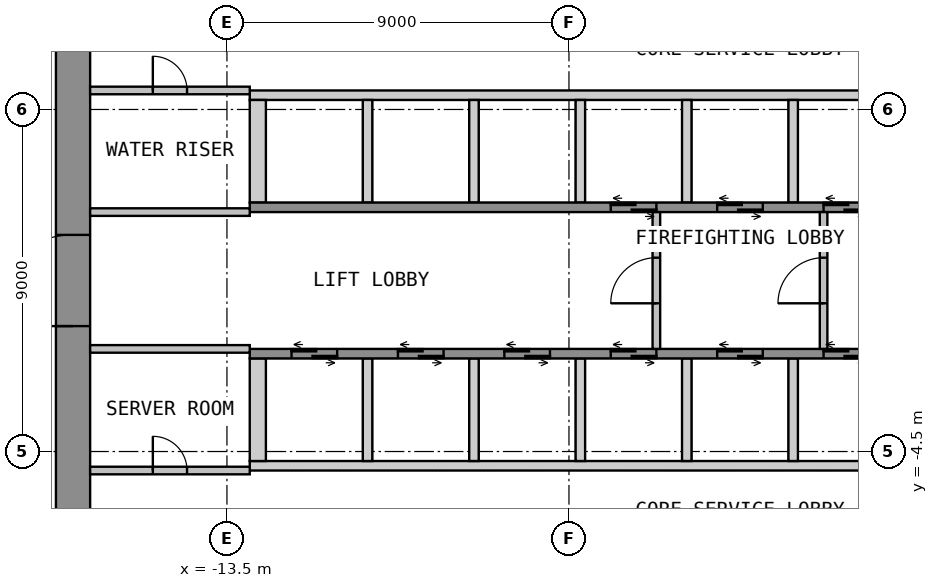
"""IFC4 building model, lengths in metres.
Left out: names, types, materials, properties, quantities, classifications, styles, units other than length and angle.
Written with IfcOpenShell. Run it as: python <this file> out.ifc"""

import sys

from ifc_helpers import new_model, si_unit, direction, frame, frame_2d, origin, place, context, subcontext, project, spatial, polyline, rectangle, outline, extrude, element, fill, save


model = new_model("IFC4")
c1 = context("Model", 3, precision=1e-05, world=origin(), true_north=direction((0.0, 1.0)))
c2 = subcontext(c1, "Body", "Model", "MODEL_VIEW")
j1 = project(units=[si_unit("LENGTHUNIT", "METRE"), si_unit("PLANEANGLEUNIT", "RADIAN")], contexts=[c1])
p1 = place(None, origin())
s1 = spatial("IfcSite", under=j1, at=p1, CompositionType="ELEMENT")
p2 = place(p1, origin())
s2 = spatial("IfcBuilding", under=s1, at=p2, CompositionType="ELEMENT")
p3 = place(p2, frame((0.0, 0.0, 30.0)))
s3 = spatial("IfcBuildingStorey", under=s2, at=p3, CompositionType="ELEMENT", Elevation=30.0)
p4 = place(p3, frame((-17.55, -12.6, 0.0), z_axis=(0.0, 0.0, 1.0), x_axis=(0.0, 1.0, 0.0)))
e1 = element("IfcWall", 1, at=p4, inside=s3, PredefinedType="SHEAR", context=c2, shape_type="SweptSolid", body=[
    extrude(rectangle(XDim=25.2, YDim=0.9, at=frame_2d((12.6, 0.0))), origin(), (0.0, 0.0, 1.0), 3.525),
])
p5 = place(p4, frame((11.4, 0.0, 0.0)))
e2 = element("IfcOpeningElement", 2, at=p5, cuts=e1, PredefinedType="OPENING", context=c2, shape_type="SweptSolid", body=[
    extrude(rectangle(XDim=2.4, YDim=2.1, at=frame_2d((1.2, 1.05))), frame((0.0, 0.46, 0.0), z_axis=(0.0, -1.0, 0.0), x_axis=(1.0, 0.0, 0.0)), (0.0, 0.0, 1.0), 0.92),
])
p6 = place(p3, origin())
e3 = element("IfcWall", 3, at=p6, inside=s3, PredefinedType="SHEAR", context=c2, shape_type="SweptSolid", body=[
    extrude(outline(polyline([(-12.9, 4.75), (12.9, 4.75), (12.9, 5.0), (-12.9, 5.0), (-12.9, 4.75)])), origin(), (0.0, 0.0, 1.0), 3.525),
])
p7 = place(p3, origin())
e4 = element("IfcWall", 4, at=p7, inside=s3, PredefinedType="SHEAR", context=c2, shape_type="SweptSolid", body=[
    extrude(outline(polyline([(-12.9, 2.05), (-12.475, 2.05), (-12.475, 4.75), (-12.9, 4.75), (-12.9, 2.05)])), origin(), (0.0, 0.0, 1.0), 3.525),
])
p8 = place(p3, origin())
e5 = element("IfcWall", 5, at=p8, inside=s3, PredefinedType="SHEAR", context=c2, shape_type="SweptSolid", body=[
    extrude(outline(polyline([(-9.925, 2.05), (-9.675, 2.05), (-9.675, 4.75), (-9.925, 4.75), (-9.925, 2.05)])), origin(), (0.0, 0.0, 1.0), 3.525),
])
p9 = place(p3, origin())
e6 = element("IfcWall", 6, at=p9, inside=s3, PredefinedType="SHEAR", context=c2, shape_type="SweptSolid", body=[
    extrude(outline(polyline([(-7.125, 2.05), (-6.875, 2.05), (-6.875, 4.75), (-7.125, 4.75), (-7.125, 2.05)])), origin(), (0.0, 0.0, 1.0), 3.525),
])
p10 = place(p3, origin())
e7 = element("IfcWall", 7, at=p10, inside=s3, PredefinedType="SHEAR", context=c2, shape_type="SweptSolid", body=[
    extrude(outline(polyline([(-4.325, 2.05), (-4.075, 2.05), (-4.075, 4.75), (-4.325, 4.75), (-4.325, 2.05)])), origin(), (0.0, 0.0, 1.0), 3.525),
])
p11 = place(p3, origin())
e8 = element("IfcWall", 8, at=p11, inside=s3, PredefinedType="SHEAR", context=c2, shape_type="SweptSolid", body=[
    extrude(outline(polyline([(-1.525, 2.05), (-1.275, 2.05), (-1.275, 4.75), (-1.525, 4.75), (-1.525, 2.05)])), origin(), (0.0, 0.0, 1.0), 3.525),
])
p12 = place(p3, origin())
e9 = element("IfcWall", 9, at=p12, inside=s3, PredefinedType="SHEAR", context=c2, shape_type="SweptSolid", body=[
    extrude(outline(polyline([(1.275, 2.05), (1.525, 2.05), (1.525, 4.75), (1.275, 4.75), (1.275, 2.05)])), origin(), (0.0, 0.0, 1.0), 3.525),
])
p13 = place(p3, frame((-12.9, 1.925, 0.0), z_axis=(0.0, 0.0, 1.0), x_axis=(1.0, 0.0, 0.0)))
e10 = element("IfcWall", 10, at=p13, inside=s3, PredefinedType="SHEAR", context=c2, shape_type="SweptSolid", body=[
    extrude(rectangle(XDim=25.8, YDim=0.25, at=frame_2d((12.9, 0.0))), origin(), (0.0, 0.0, 1.0), 3.525),
])
p14 = place(p13, frame((9.5, 0.0, 0.0)))
e11 = element("IfcOpeningElement", 11, at=p14, cuts=e10, PredefinedType="OPENING", context=c2, shape_type="SweptSolid", body=[
    extrude(rectangle(XDim=1.2, YDim=2.1, at=frame_2d((0.6, 1.05))), frame((0.0, 0.135, 0.0), z_axis=(0.0, -1.0, 0.0), x_axis=(1.0, 0.0, 0.0)), (0.0, 0.0, 1.0), 0.27),
])
p15 = place(p13, frame((12.3, 0.0, 0.0)))
e12 = element("IfcOpeningElement", 12, at=p15, cuts=e10, PredefinedType="OPENING", context=c2, shape_type="SweptSolid", body=[
    extrude(rectangle(XDim=1.2, YDim=2.1, at=frame_2d((0.6, 1.05))), frame((0.0, 0.135, 0.0), z_axis=(0.0, -1.0, 0.0), x_axis=(1.0, 0.0, 0.0)), (0.0, 0.0, 1.0), 0.27),
])
p16 = place(p13, frame((15.1, 0.0, 0.0)))
e13 = element("IfcOpeningElement", 13, at=p16, cuts=e10, PredefinedType="OPENING", context=c2, shape_type="SweptSolid", body=[
    extrude(rectangle(XDim=1.2, YDim=2.1, at=frame_2d((0.6, 1.05))), frame((0.0, 0.135, 0.0), z_axis=(0.0, -1.0, 0.0), x_axis=(1.0, 0.0, 0.0)), (0.0, 0.0, 1.0), 0.27),
])
p17 = place(p13, frame((17.9, 0.0, 0.0)))
e14 = element("IfcOpeningElement", 14, at=p17, cuts=e10, PredefinedType="OPENING", context=c2, shape_type="SweptSolid", body=[
    extrude(rectangle(XDim=1.2, YDim=2.1, at=frame_2d((0.6, 1.05))), frame((0.0, 0.135, 0.0), z_axis=(0.0, -1.0, 0.0), x_axis=(1.0, 0.0, 0.0)), (0.0, 0.0, 1.0), 0.27),
])
p18 = place(p13, frame((20.7, 0.0, 0.0)))
e15 = element("IfcOpeningElement", 15, at=p18, cuts=e10, PredefinedType="OPENING", context=c2, shape_type="SweptSolid", body=[
    extrude(rectangle(XDim=1.2, YDim=2.1, at=frame_2d((0.6, 1.05))), frame((0.0, 0.135, 0.0), z_axis=(0.0, -1.0, 0.0), x_axis=(1.0, 0.0, 0.0)), (0.0, 0.0, 1.0), 0.27),
])
p19 = place(p13, frame((23.5, 0.0, 0.0)))
e16 = element("IfcOpeningElement", 16, at=p19, cuts=e10, PredefinedType="OPENING", context=c2, shape_type="SweptSolid", body=[
    extrude(rectangle(XDim=1.2, YDim=2.1, at=frame_2d((0.6, 1.05))), frame((0.0, 0.135, 0.0), z_axis=(0.0, -1.0, 0.0), x_axis=(1.0, 0.0, 0.0)), (0.0, 0.0, 1.0), 0.27),
])
p20 = place(p3, origin())
e17 = element("IfcWall", 17, at=p20, inside=s3, PredefinedType="SHEAR", context=c2, shape_type="SweptSolid", body=[
    extrude(outline(polyline([(-12.9, -5.0), (12.9, -5.0), (12.9, -4.75), (-12.9, -4.75), (-12.9, -5.0)])), origin(), (0.0, 0.0, 1.0), 3.525),
])
p21 = place(p3, origin())
e18 = element("IfcWall", 18, at=p21, inside=s3, PredefinedType="SHEAR", context=c2, shape_type="SweptSolid", body=[
    extrude(outline(polyline([(-12.9, -4.75), (-12.475, -4.75), (-12.475, -2.05), (-12.9, -2.05), (-12.9, -4.75)])), origin(), (0.0, 0.0, 1.0), 3.525),
])
p22 = place(p3, origin())
e19 = element("IfcWall", 19, at=p22, inside=s3, PredefinedType="SHEAR", context=c2, shape_type="SweptSolid", body=[
    extrude(outline(polyline([(-9.925, -4.75), (-9.675, -4.75), (-9.675, -2.05), (-9.925, -2.05), (-9.925, -4.75)])), origin(), (0.0, 0.0, 1.0), 3.525),
])
p23 = place(p3, origin())
e20 = element("IfcWall", 20, at=p23, inside=s3, PredefinedType="SHEAR", context=c2, shape_type="SweptSolid", body=[
    extrude(outline(polyline([(-7.125, -4.75), (-6.875, -4.75), (-6.875, -2.05), (-7.125, -2.05), (-7.125, -4.75)])), origin(), (0.0, 0.0, 1.0), 3.525),
])
p24 = place(p3, origin())
e21 = element("IfcWall", 21, at=p24, inside=s3, PredefinedType="SHEAR", context=c2, shape_type="SweptSolid", body=[
    extrude(outline(polyline([(-4.325, -4.75), (-4.075, -4.75), (-4.075, -2.05), (-4.325, -2.05), (-4.325, -4.75)])), origin(), (0.0, 0.0, 1.0), 3.525),
])
p25 = place(p3, origin())
e22 = element("IfcWall", 22, at=p25, inside=s3, PredefinedType="SHEAR", context=c2, shape_type="SweptSolid", body=[
    extrude(outline(polyline([(-1.525, -4.75), (-1.275, -4.75), (-1.275, -2.05), (-1.525, -2.05), (-1.525, -4.75)])), origin(), (0.0, 0.0, 1.0), 3.525),
])
p26 = place(p3, origin())
e23 = element("IfcWall", 23, at=p26, inside=s3, PredefinedType="SHEAR", context=c2, shape_type="SweptSolid", body=[
    extrude(outline(polyline([(1.275, -4.75), (1.525, -4.75), (1.525, -2.05), (1.275, -2.05), (1.275, -4.75)])), origin(), (0.0, 0.0, 1.0), 3.525),
])
p27 = place(p3, frame((-12.9, -1.925, 0.0), z_axis=(0.0, 0.0, 1.0), x_axis=(1.0, 0.0, 0.0)))
e24 = element("IfcWall", 24, at=p27, inside=s3, PredefinedType="SHEAR", context=c2, shape_type="SweptSolid", body=[
    extrude(rectangle(XDim=25.8, YDim=0.25, at=frame_2d((12.9, 0.0))), origin(), (0.0, 0.0, 1.0), 3.525),
])
p28 = place(p27, frame((1.1, 0.0, 0.0)))
e25 = element("IfcOpeningElement", 25, at=p28, cuts=e24, PredefinedType="OPENING", context=c2, shape_type="SweptSolid", body=[
    extrude(rectangle(XDim=1.2, YDim=2.1, at=frame_2d((0.6, 1.05))), frame((0.0, 0.135, 0.0), z_axis=(0.0, -1.0, 0.0), x_axis=(1.0, 0.0, 0.0)), (0.0, 0.0, 1.0), 0.27),
])
p29 = place(p27, frame((3.9, 0.0, 0.0)))
e26 = element("IfcOpeningElement", 26, at=p29, cuts=e24, PredefinedType="OPENING", context=c2, shape_type="SweptSolid", body=[
    extrude(rectangle(XDim=1.2, YDim=2.1, at=frame_2d((0.6, 1.05))), frame((0.0, 0.135, 0.0), z_axis=(0.0, -1.0, 0.0), x_axis=(1.0, 0.0, 0.0)), (0.0, 0.0, 1.0), 0.27),
])
p30 = place(p27, frame((6.7, 0.0, 0.0)))
e27 = element("IfcOpeningElement", 27, at=p30, cuts=e24, PredefinedType="OPENING", context=c2, shape_type="SweptSolid", body=[
    extrude(rectangle(XDim=1.2, YDim=2.1, at=frame_2d((0.6, 1.05))), frame((0.0, 0.135, 0.0), z_axis=(0.0, -1.0, 0.0), x_axis=(1.0, 0.0, 0.0)), (0.0, 0.0, 1.0), 0.27),
])
p31 = place(p27, frame((9.5, 0.0, 0.0)))
e28 = element("IfcOpeningElement", 28, at=p31, cuts=e24, PredefinedType="OPENING", context=c2, shape_type="SweptSolid", body=[
    extrude(rectangle(XDim=1.2, YDim=2.1, at=frame_2d((0.6, 1.05))), frame((0.0, 0.135, 0.0), z_axis=(0.0, -1.0, 0.0), x_axis=(1.0, 0.0, 0.0)), (0.0, 0.0, 1.0), 0.27),
])
p32 = place(p27, frame((12.3, 0.0, 0.0)))
e29 = element("IfcOpeningElement", 29, at=p32, cuts=e24, PredefinedType="OPENING", context=c2, shape_type="SweptSolid", body=[
    extrude(rectangle(XDim=1.2, YDim=2.1, at=frame_2d((0.6, 1.05))), frame((0.0, 0.135, 0.0), z_axis=(0.0, -1.0, 0.0), x_axis=(1.0, 0.0, 0.0)), (0.0, 0.0, 1.0), 0.27),
])
p33 = place(p27, frame((15.1, 0.0, 0.0)))
e30 = element("IfcOpeningElement", 30, at=p33, cuts=e24, PredefinedType="OPENING", context=c2, shape_type="SweptSolid", body=[
    extrude(rectangle(XDim=1.2, YDim=2.1, at=frame_2d((0.6, 1.05))), frame((0.0, 0.135, 0.0), z_axis=(0.0, -1.0, 0.0), x_axis=(1.0, 0.0, 0.0)), (0.0, 0.0, 1.0), 0.27),
])
p34 = place(p3, frame((-2.2, -1.8, 0.0), z_axis=(0.0, 0.0, 1.0), x_axis=(0.0, 1.0, 0.0)))
e31 = element("IfcWall", 31, at=p34, inside=s3, PredefinedType="PARTITIONING", context=c2, shape_type="SweptSolid", body=[
    extrude(rectangle(XDim=3.6, YDim=0.2, at=frame_2d((1.8, 0.0))), origin(), (0.0, 0.0, 1.0), 3.525),
])
p35 = place(p34, frame((1.2, 0.0, 0.0)))
e32 = element("IfcOpeningElement", 32, at=p35, cuts=e31, PredefinedType="OPENING", context=c2, shape_type="SweptSolid", body=[
    extrude(rectangle(XDim=1.2, YDim=2.1, at=frame_2d((0.6, 1.05))), frame((0.0, 0.11, 0.0), z_axis=(0.0, -1.0, 0.0), x_axis=(1.0, 0.0, 0.0)), (0.0, 0.0, 1.0), 0.22),
])
p36 = place(p3, frame((2.2, -1.8, 0.0), z_axis=(0.0, 0.0, 1.0), x_axis=(0.0, 1.0, 0.0)))
e33 = element("IfcWall", 33, at=p36, inside=s3, PredefinedType="PARTITIONING", context=c2, shape_type="SweptSolid", body=[
    extrude(rectangle(XDim=3.6, YDim=0.2, at=frame_2d((1.8, 0.0))), origin(), (0.0, 0.0, 1.0), 3.525),
])
p37 = place(p36, frame((1.2, 0.0, 0.0)))
e34 = element("IfcOpeningElement", 34, at=p37, cuts=e33, PredefinedType="OPENING", context=c2, shape_type="SweptSolid", body=[
    extrude(rectangle(XDim=1.2, YDim=2.1, at=frame_2d((0.6, 1.05))), frame((0.0, 0.11, 0.0), z_axis=(0.0, -1.0, 0.0), x_axis=(1.0, 0.0, 0.0)), (0.0, 0.0, 1.0), 0.22),
])
p38 = place(p3, frame((-17.1, 5.0, 0.0), z_axis=(0.0, 0.0, 1.0), x_axis=(1.0, 0.0, 0.0)))
e35 = element("IfcWall", 35, at=p38, inside=s3, PredefinedType="PARTITIONING", context=c2, shape_type="SweptSolid", body=[
    extrude(rectangle(XDim=4.2, YDim=0.2, at=frame_2d((2.1, 0.0))), origin(), (0.0, 0.0, 1.0), 3.525),
])
p39 = place(p38, frame((1.65, 0.0, 0.0)))
e36 = element("IfcOpeningElement", 36, at=p39, cuts=e35, PredefinedType="OPENING", context=c2, shape_type="SweptSolid", body=[
    extrude(rectangle(XDim=0.9, YDim=2.1, at=frame_2d((0.45, 1.05))), frame((0.0, 0.11, 0.0), z_axis=(0.0, -1.0, 0.0), x_axis=(1.0, 0.0, 0.0)), (0.0, 0.0, 1.0), 0.22),
])
p40 = place(p3, frame((-17.1, 1.8, 0.0), z_axis=(0.0, 0.0, 1.0), x_axis=(1.0, 0.0, 0.0)))
e37 = element("IfcWall", 37, at=p40, inside=s3, PredefinedType="PARTITIONING", context=c2, shape_type="SweptSolid", body=[
    extrude(rectangle(XDim=4.2, YDim=0.2, at=frame_2d((2.1, 0.0))), origin(), (0.0, 0.0, 1.0), 3.525),
])
p41 = place(p3, frame((-17.1, -5.0, 0.0), z_axis=(0.0, 0.0, 1.0), x_axis=(1.0, 0.0, 0.0)))
e38 = element("IfcWall", 38, at=p41, inside=s3, PredefinedType="PARTITIONING", context=c2, shape_type="SweptSolid", body=[
    extrude(rectangle(XDim=4.2, YDim=0.2, at=frame_2d((2.1, 0.0))), origin(), (0.0, 0.0, 1.0), 3.525),
])
p42 = place(p41, frame((1.65, 0.0, 0.0)))
e39 = element("IfcOpeningElement", 39, at=p42, cuts=e38, PredefinedType="OPENING", context=c2, shape_type="SweptSolid", body=[
    extrude(rectangle(XDim=0.9, YDim=2.1, at=frame_2d((0.45, 1.05))), frame((0.0, 0.11, 0.0), z_axis=(0.0, -1.0, 0.0), x_axis=(1.0, 0.0, 0.0)), (0.0, 0.0, 1.0), 0.22),
])
p43 = place(p3, frame((-17.1, -1.8, 0.0), z_axis=(0.0, 0.0, 1.0), x_axis=(1.0, 0.0, 0.0)))
e40 = element("IfcWall", 40, at=p43, inside=s3, PredefinedType="PARTITIONING", context=c2, shape_type="SweptSolid", body=[
    extrude(rectangle(XDim=4.2, YDim=0.2, at=frame_2d((2.1, 0.0))), origin(), (0.0, 0.0, 1.0), 3.525),
])
p44 = place(p5, origin())
e41 = element("IfcDoor", 41, at=p44, inside=s3, OperationType="DOUBLE_DOOR_DOUBLE_SWING", PredefinedType="DOOR", context=c2, shape_type="SweptSolid", body=[
    extrude(rectangle(XDim=2.4, YDim=2.1, at=frame_2d((1.2, 1.05))), frame((0.0, 0.025, 0.0), z_axis=(0.0, -1.0, 0.0), x_axis=(1.0, 0.0, 0.0)), (0.0, 0.0, 1.0), 0.05),
])
fill(e2, e41)
p45 = place(p14, origin())
e42 = element("IfcDoor", 42, at=p45, inside=s3, OperationType="DOUBLE_DOOR_SLIDING", PredefinedType="DOOR", context=c2, shape_type="SweptSolid", body=[
    extrude(rectangle(XDim=1.2, YDim=2.1, at=frame_2d((0.6, 1.05))), frame((0.0, 0.025, 0.0), z_axis=(0.0, -1.0, 0.0), x_axis=(1.0, 0.0, 0.0)), (0.0, 0.0, 1.0), 0.05),
])
fill(e11, e42)
p46 = place(p15, origin())
e43 = element("IfcDoor", 43, at=p46, inside=s3, OperationType="DOUBLE_DOOR_SLIDING", PredefinedType="DOOR", context=c2, shape_type="SweptSolid", body=[
    extrude(rectangle(XDim=1.2, YDim=2.1, at=frame_2d((0.6, 1.05))), frame((0.0, 0.025, 0.0), z_axis=(0.0, -1.0, 0.0), x_axis=(1.0, 0.0, 0.0)), (0.0, 0.0, 1.0), 0.05),
])
fill(e12, e43)
p47 = place(p16, origin())
e44 = element("IfcDoor", 44, at=p47, inside=s3, OperationType="DOUBLE_DOOR_SLIDING", PredefinedType="DOOR", context=c2, shape_type="SweptSolid", body=[
    extrude(rectangle(XDim=1.2, YDim=2.1, at=frame_2d((0.6, 1.05))), frame((0.0, 0.025, 0.0), z_axis=(0.0, -1.0, 0.0), x_axis=(1.0, 0.0, 0.0)), (0.0, 0.0, 1.0), 0.05),
])
fill(e13, e44)
p48 = place(p28, origin())
e45 = element("IfcDoor", 45, at=p48, inside=s3, OperationType="DOUBLE_DOOR_SLIDING", PredefinedType="DOOR", context=c2, shape_type="SweptSolid", body=[
    extrude(rectangle(XDim=1.2, YDim=2.1, at=frame_2d((0.6, 1.05))), frame((0.0, 0.025, 0.0), z_axis=(0.0, -1.0, 0.0), x_axis=(1.0, 0.0, 0.0)), (0.0, 0.0, 1.0), 0.05),
])
fill(e25, e45)
p49 = place(p29, origin())
e46 = element("IfcDoor", 46, at=p49, inside=s3, OperationType="DOUBLE_DOOR_SLIDING", PredefinedType="DOOR", context=c2, shape_type="SweptSolid", body=[
    extrude(rectangle(XDim=1.2, YDim=2.1, at=frame_2d((0.6, 1.05))), frame((0.0, 0.025, 0.0), z_axis=(0.0, -1.0, 0.0), x_axis=(1.0, 0.0, 0.0)), (0.0, 0.0, 1.0), 0.05),
])
fill(e26, e46)
p50 = place(p30, origin())
e47 = element("IfcDoor", 47, at=p50, inside=s3, OperationType="DOUBLE_DOOR_SLIDING", PredefinedType="DOOR", context=c2, shape_type="SweptSolid", body=[
    extrude(rectangle(XDim=1.2, YDim=2.1, at=frame_2d((0.6, 1.05))), frame((0.0, 0.025, 0.0), z_axis=(0.0, -1.0, 0.0), x_axis=(1.0, 0.0, 0.0)), (0.0, 0.0, 1.0), 0.05),
])
fill(e27, e47)
p51 = place(p31, origin())
e48 = element("IfcDoor", 48, at=p51, inside=s3, OperationType="DOUBLE_DOOR_SLIDING", PredefinedType="DOOR", context=c2, shape_type="SweptSolid", body=[
    extrude(rectangle(XDim=1.2, YDim=2.1, at=frame_2d((0.6, 1.05))), frame((0.0, 0.025, 0.0), z_axis=(0.0, -1.0, 0.0), x_axis=(1.0, 0.0, 0.0)), (0.0, 0.0, 1.0), 0.05),
])
fill(e28, e48)
p52 = place(p32, origin())
e49 = element("IfcDoor", 49, at=p52, inside=s3, OperationType="DOUBLE_DOOR_SLIDING", PredefinedType="DOOR", context=c2, shape_type="SweptSolid", body=[
    extrude(rectangle(XDim=1.2, YDim=2.1, at=frame_2d((0.6, 1.05))), frame((0.0, 0.025, 0.0), z_axis=(0.0, -1.0, 0.0), x_axis=(1.0, 0.0, 0.0)), (0.0, 0.0, 1.0), 0.05),
])
fill(e29, e49)
p53 = place(p33, origin())
e50 = element("IfcDoor", 50, at=p53, inside=s3, OperationType="DOUBLE_DOOR_SLIDING", PredefinedType="DOOR", context=c2, shape_type="SweptSolid", body=[
    extrude(rectangle(XDim=1.2, YDim=2.1, at=frame_2d((0.6, 1.05))), frame((0.0, 0.025, 0.0), z_axis=(0.0, -1.0, 0.0), x_axis=(1.0, 0.0, 0.0)), (0.0, 0.0, 1.0), 0.05),
])
fill(e30, e50)
p54 = place(p35, origin())
e51 = element("IfcDoor", 51, at=p54, inside=s3, OperationType="SINGLE_SWING_LEFT", PredefinedType="DOOR", context=c2, shape_type="SweptSolid", body=[
    extrude(rectangle(XDim=1.2, YDim=2.1, at=frame_2d((0.6, 1.05))), frame((0.0, 0.025, 0.0), z_axis=(0.0, -1.0, 0.0), x_axis=(1.0, 0.0, 0.0)), (0.0, 0.0, 1.0), 0.05),
])
fill(e32, e51)
p55 = place(p37, origin())
e52 = element("IfcDoor", 52, at=p55, inside=s3, OperationType="SINGLE_SWING_LEFT", PredefinedType="DOOR", context=c2, shape_type="SweptSolid", body=[
    extrude(rectangle(XDim=1.2, YDim=2.1, at=frame_2d((0.6, 1.05))), frame((0.0, 0.025, 0.0), z_axis=(0.0, -1.0, 0.0), x_axis=(1.0, 0.0, 0.0)), (0.0, 0.0, 1.0), 0.05),
])
fill(e34, e52)
p56 = place(p39, origin())
e53 = element("IfcDoor", 53, at=p56, inside=s3, OperationType="SINGLE_SWING_LEFT", PredefinedType="DOOR", context=c2, shape_type="SweptSolid", body=[
    extrude(rectangle(XDim=0.9, YDim=2.1, at=frame_2d((0.45, 1.05))), frame((0.0, 0.025, 0.0), z_axis=(0.0, -1.0, 0.0), x_axis=(1.0, 0.0, 0.0)), (0.0, 0.0, 1.0), 0.05),
])
fill(e36, e53)
p57 = place(p42, origin())
e54 = element("IfcDoor", 54, at=p57, inside=s3, OperationType="SINGLE_SWING_LEFT", PredefinedType="DOOR", context=c2, shape_type="SweptSolid", body=[
    extrude(rectangle(XDim=0.9, YDim=2.1, at=frame_2d((0.45, 1.05))), frame((0.0, 0.025, 0.0), z_axis=(0.0, -1.0, 0.0), x_axis=(1.0, 0.0, 0.0)), (0.0, 0.0, 1.0), 0.05),
])
fill(e39, e54)
save(model, sys.argv[1])
